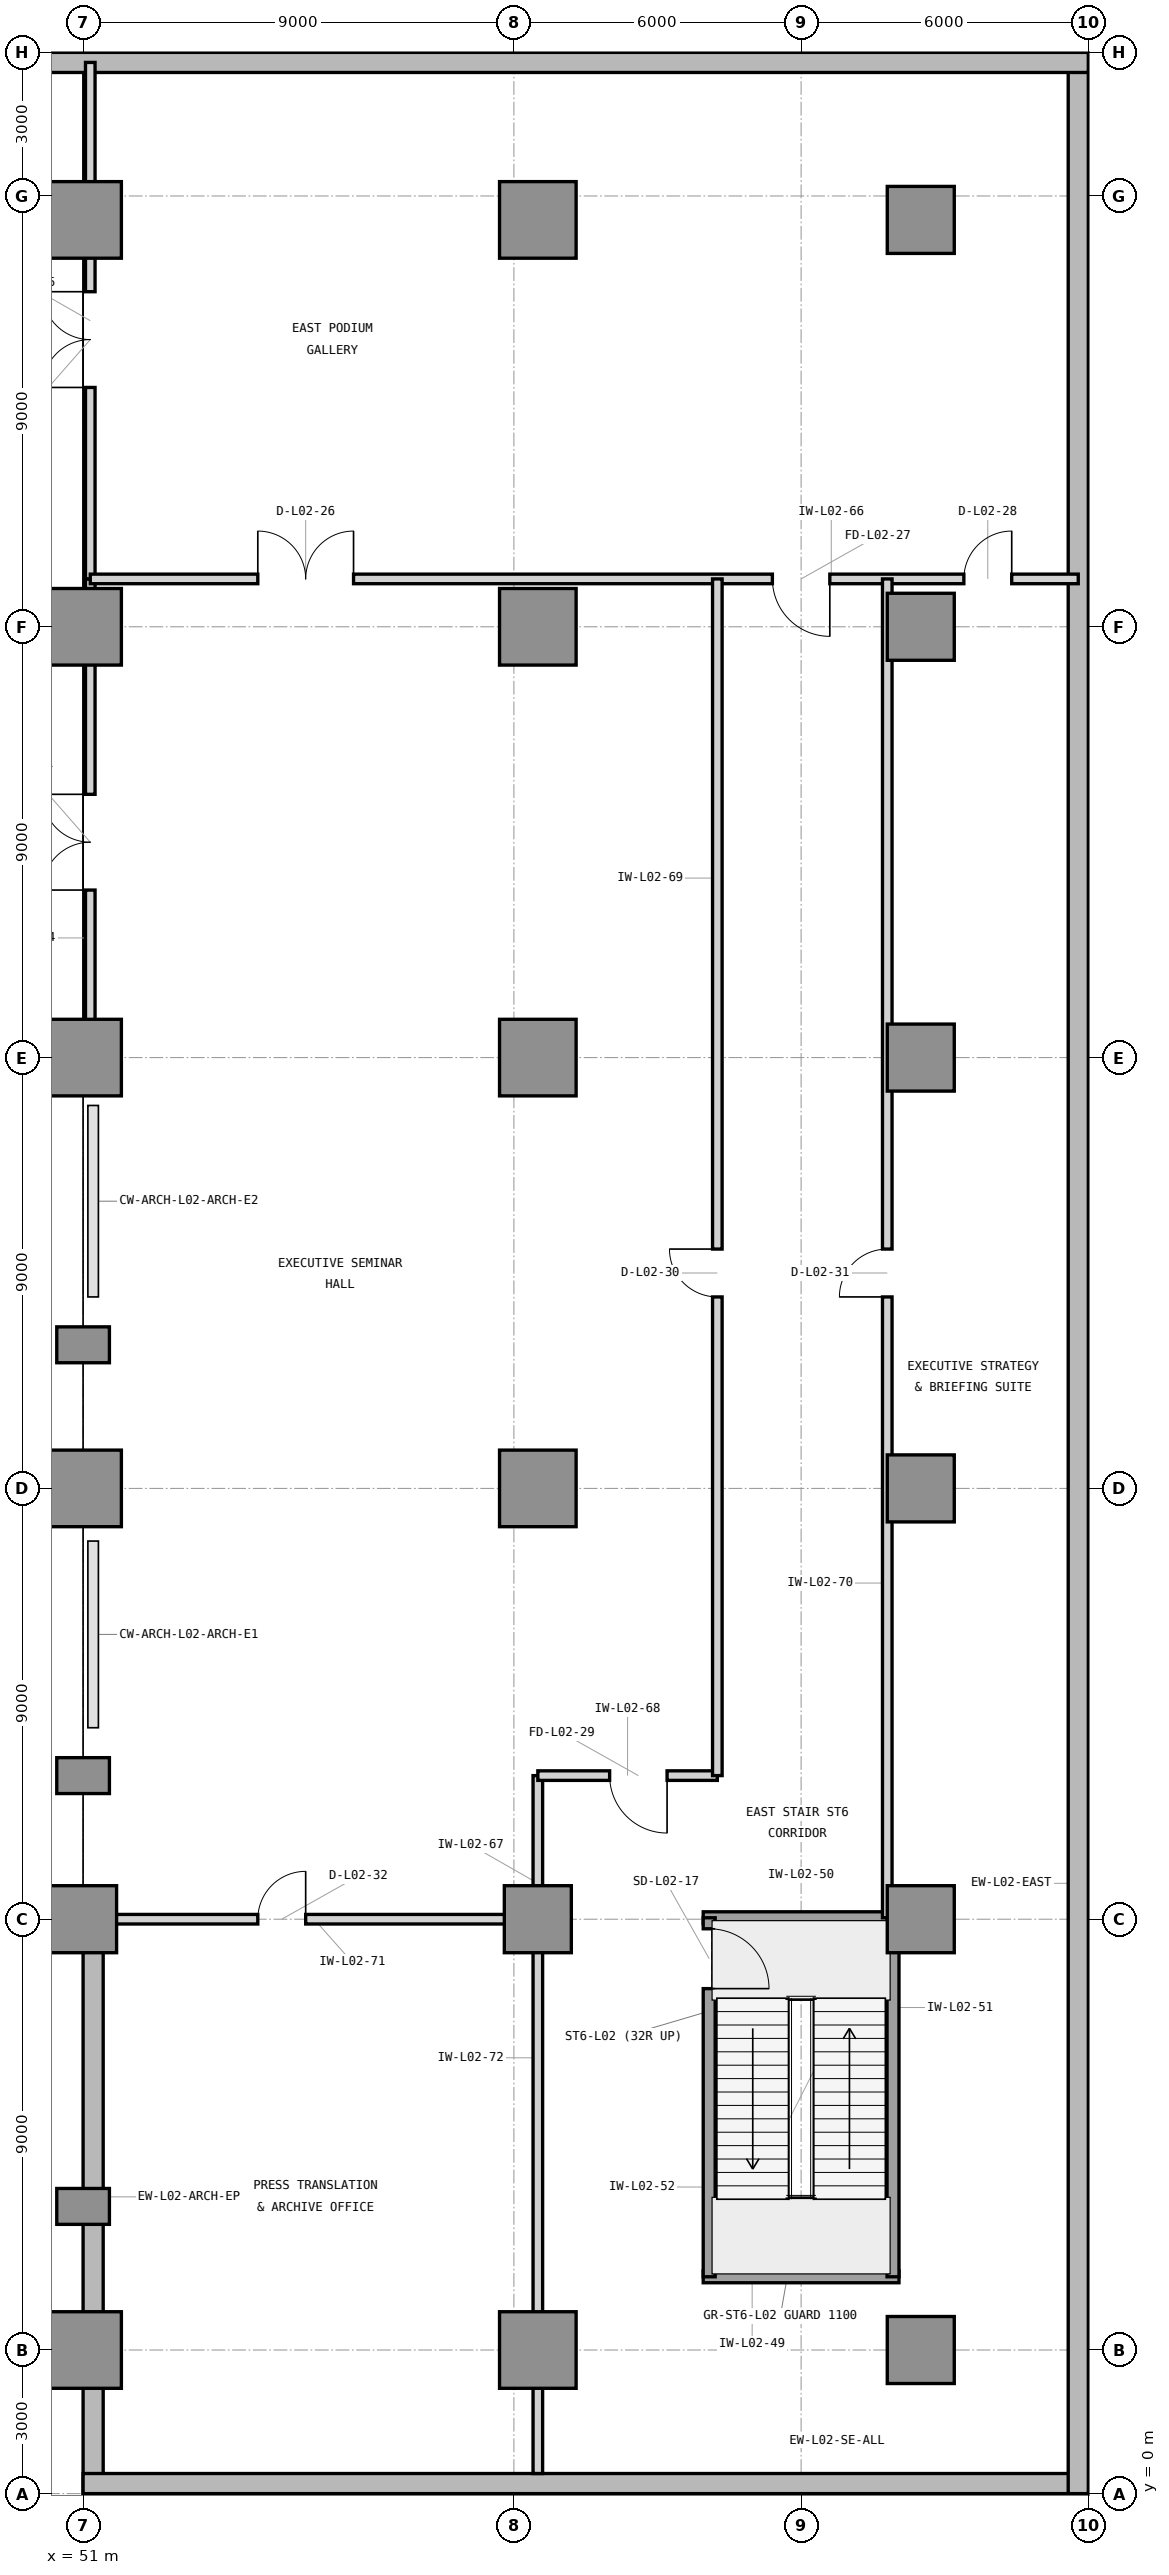
"""IFC4 building model, lengths in metres.
Left out: names, types, materials, properties, quantities, classifications, styles, units other than length and angle.
Written with IfcOpenShell. Run it as: python <this file> out.ifc"""

import sys

from ifc_helpers import new_model, si_unit, direction, frame, frame_2d, origin, origin_2d, place, context, subcontext, project, spatial, rectangle, extrude, element, fill, save


model = new_model("IFC4")
c1 = context("Model", 3, precision=1e-05, world=origin(), true_north=direction((0.0, 1.0)))
c2 = subcontext(c1, "Body", "Model", "MODEL_VIEW")
j1 = project(units=[si_unit("LENGTHUNIT", "METRE"), si_unit("PLANEANGLEUNIT", "RADIAN")], contexts=[c1])
p1 = place(None, origin())
s1 = spatial("IfcSite", under=j1, at=p1, CompositionType="ELEMENT")
p2 = place(p1, origin())
s2 = spatial("IfcBuilding", under=s1, at=p2, CompositionType="ELEMENT")
p3 = place(p2, frame((0.0, 0.0, 10.8)))
s3 = spatial("IfcBuildingStorey", under=s2, at=p3, CompositionType="ELEMENT", Elevation=10.8)
p4 = place(p3, frame((51.0, 3.0, 0.0), z_axis=(0.0, 0.0, 1.0), x_axis=(1.0, 0.0, 0.0)))
e1 = element("IfcColumn", 1, at=p4, inside=s3, PredefinedType="COLUMN", context=c2, shape_type="SweptSolid", body=[
    extrude(rectangle(XDim=1.6, YDim=1.6, at=origin_2d()), origin(), (0.0, 0.0, 1.0), 4.8),
])
p5 = place(p3, frame((51.0, 12.0, 0.0), z_axis=(0.0, 0.0, 1.0), x_axis=(1.0, 0.0, 0.0)))
e2 = element("IfcColumn", 2, at=p5, inside=s3, PredefinedType="COLUMN", context=c2, shape_type="SweptSolid", body=[
    extrude(rectangle(XDim=1.4, YDim=1.4, at=origin_2d()), origin(), (0.0, 0.0, 1.0), 4.8),
])
for number, where, z_axis, x_axis in (
    (3, (51.0, 21.0, 0.0), (0.0, 0.0, 1.0), (1.0, 0.0, 0.0)),
    (4, (51.0, 30.0, 0.0), (0.0, 0.0, 1.0), (1.0, 0.0, 0.0)),
    (5, (51.0, 39.0, 0.0), (0.0, 0.0, 1.0), (1.0, 0.0, 0.0)),
    (6, (51.0, 47.5, 0.0), (0.0, 0.0, 1.0), (1.0, 0.0, 0.0)),
    (7, (60.5, 3.0, 0.0), (0.0, 0.0, 1.0), (1.0, 0.0, 0.0)),
):
    element("IfcColumn", number, at=place(p3, frame(where, z_axis=z_axis, x_axis=x_axis)), inside=s3, PredefinedType="COLUMN", context=c2, shape_type="SweptSolid", body=[
        extrude(rectangle(XDim=1.6, YDim=1.6, at=origin_2d()), origin(), (0.0, 0.0, 1.0), 4.8),
    ])
p6 = place(p3, frame((60.5, 12.0, 0.0), z_axis=(0.0, 0.0, 1.0), x_axis=(1.0, 0.0, 0.0)))
e8 = element("IfcColumn", 8, at=p6, inside=s3, PredefinedType="COLUMN", context=c2, shape_type="SweptSolid", body=[
    extrude(rectangle(XDim=1.4, YDim=1.4, at=origin_2d()), origin(), (0.0, 0.0, 1.0), 4.8),
])
for number, where, z_axis, x_axis in (
    (9, (60.5, 21.0, 0.0), (0.0, 0.0, 1.0), (1.0, 0.0, 0.0)),
    (10, (60.5, 30.0, 0.0), (0.0, 0.0, 1.0), (1.0, 0.0, 0.0)),
    (11, (60.5, 39.0, 0.0), (0.0, 0.0, 1.0), (1.0, 0.0, 0.0)),
    (12, (60.5, 47.5, 0.0), (0.0, 0.0, 1.0), (1.0, 0.0, 0.0)),
):
    element("IfcColumn", number, at=place(p3, frame(where, z_axis=z_axis, x_axis=x_axis)), inside=s3, PredefinedType="COLUMN", context=c2, shape_type="SweptSolid", body=[
        extrude(rectangle(XDim=1.6, YDim=1.6, at=origin_2d()), origin(), (0.0, 0.0, 1.0), 4.8),
    ])
for number, where, z_axis, x_axis in (
    (13, (68.5, 3.0, 0.0), (0.0, 0.0, 1.0), (1.0, 0.0, 0.0)),
    (14, (68.5, 12.0, 0.0), (0.0, 0.0, 1.0), (1.0, 0.0, 0.0)),
    (15, (68.5, 21.0, 0.0), (0.0, 0.0, 1.0), (1.0, 0.0, 0.0)),
    (16, (68.5, 30.0, 0.0), (0.0, 0.0, 1.0), (1.0, 0.0, 0.0)),
    (17, (68.5, 39.0, 0.0), (0.0, 0.0, 1.0), (1.0, 0.0, 0.0)),
    (18, (68.5, 47.5, 0.0), (0.0, 0.0, 1.0), (1.0, 0.0, 0.0)),
):
    element("IfcColumn", number, at=place(p3, frame(where, z_axis=z_axis, x_axis=x_axis)), inside=s3, PredefinedType="COLUMN", context=c2, shape_type="SweptSolid", body=[
        extrude(rectangle(XDim=1.4, YDim=1.4, at=origin_2d()), origin(), (0.0, 0.0, 1.0), 4.8),
    ])
for number, where, z_axis, x_axis in (
    (19, (51.0, 6.0, 0.0), (0.0, 0.0, 1.0), (1.0, 0.0, 0.0)),
    (20, (51.0, 15.0, 0.0), (0.0, 0.0, 1.0), (1.0, 0.0, 0.0)),
    (21, (51.0, 24.0, 0.0), (0.0, 0.0, 1.0), (1.0, 0.0, 0.0)),
):
    element("IfcColumn", number, at=place(p3, frame(where, z_axis=z_axis, x_axis=x_axis)), inside=s3, PredefinedType="PILASTER", context=c2, shape_type="SweptSolid", body=[
        extrude(rectangle(XDim=0.75, YDim=1.1, at=origin_2d()), origin(), (0.0, 0.0, 1.0), 4.8),
    ])
p7 = place(p3, frame((33.0, 30.21, 0.0), z_axis=(0.0, 0.0, 1.0), x_axis=(1.0, 0.0, 0.0)))
e22 = element("IfcWall", 22, at=p7, inside=s3, PredefinedType="STANDARD", context=c2, shape_type="SweptSolid", body=[
    extrude(rectangle(XDim=18.0, YDim=0.42, at=frame_2d((9.0, 0.0))), origin(), (0.0, 0.0, 1.0), 3.85),
])
p8 = place(p3, frame((51.21, 0.0, 0.0), z_axis=(0.0, 0.0, 1.0), x_axis=(0.0, 1.0, 0.0)))
e23 = element("IfcWall", 23, at=p8, inside=s3, PredefinedType="STANDARD", context=c2, shape_type="SweptSolid", body=[
    extrude(rectangle(XDim=12.4, YDim=0.42, at=frame_2d((6.2, 0.0))), origin(), (0.0, 0.0, 1.0), 3.85),
])
p9 = place(p3, frame((51.0, 0.21, 0.0), z_axis=(0.0, 0.0, 1.0), x_axis=(1.0, 0.0, 0.0)))
e24 = element("IfcWall", 24, at=p9, inside=s3, PredefinedType="STANDARD", context=c2, shape_type="SweptSolid", body=[
    extrude(rectangle(XDim=21.0, YDim=0.42, at=frame_2d((10.5, 0.0))), origin(), (0.0, 0.0, 1.0), 4.8),
])
p10 = place(p3, frame((71.79, 0.0, 0.0), z_axis=(0.0, 0.0, 1.0), x_axis=(0.0, 1.0, 0.0)))
e25 = element("IfcWall", 25, at=p10, inside=s3, PredefinedType="STANDARD", context=c2, shape_type="SweptSolid", body=[
    extrude(rectangle(XDim=51.0, YDim=0.42, at=frame_2d((25.5, 0.0))), origin(), (0.0, 0.0, 1.0), 4.8),
])
p11 = place(p3, frame((72.0, 50.79, 0.0), z_axis=(0.0, 0.0, 1.0), x_axis=(-1.0, 0.0, 0.0)))
e26 = element("IfcWall", 26, at=p11, inside=s3, PredefinedType="STANDARD", context=c2, shape_type="SweptSolid", body=[
    extrude(rectangle(XDim=72.0, YDim=0.42, at=frame_2d((36.0, 0.0))), origin(), (0.0, 0.0, 1.0), 4.8),
])
for number, where, z_axis, x_axis in (
    (27, (63.955, 4.53, 0.0), (0.0, 0.0, 1.0), (1.0, 0.0, 0.0)),
    (28, (63.955, 12.03, 0.0), (0.0, 0.0, 1.0), (1.0, 0.0, 0.0)),
):
    element("IfcWall", number, at=place(p3, frame(where, z_axis=z_axis, x_axis=x_axis)), inside=s3, PredefinedType="SHEAR", context=c2, shape_type="SweptSolid", body=[
        extrude(rectangle(XDim=4.09, YDim=0.25, at=frame_2d((2.045, 0.0))), origin(), (0.0, 0.0, 1.0), 5.4),
    ])
p12 = place(p3, frame((67.92, 4.53, 0.0), z_axis=(0.0, 0.0, 1.0), x_axis=(0.0, 1.0, 0.0)))
e29 = element("IfcWall", 29, at=p12, inside=s3, PredefinedType="SHEAR", context=c2, shape_type="SweptSolid", body=[
    extrude(rectangle(XDim=7.5, YDim=0.25, at=frame_2d((3.75, 0.0))), origin(), (0.0, 0.0, 1.0), 5.4),
])
p13 = place(p3, frame((64.08, 4.53, 0.0), z_axis=(0.0, 0.0, 1.0), x_axis=(0.0, 1.0, 0.0)))
e30 = element("IfcWall", 30, at=p13, inside=s3, PredefinedType="SHEAR", context=c2, shape_type="SweptSolid", body=[
    extrude(rectangle(XDim=7.5, YDim=0.25, at=frame_2d((3.75, 0.0))), origin(), (0.0, 0.0, 1.0), 5.4),
])
p14 = place(p13, frame((6.02, 0.0, 0.0)))
e31 = element("IfcOpeningElement", 31, at=p14, cuts=e30, PredefinedType="OPENING", context=c2, shape_type="SweptSolid", body=[
    extrude(rectangle(XDim=1.25, YDim=2.2, at=frame_2d((0.625, 1.1))), frame((0.0, 0.135, 0.0), z_axis=(0.0, -1.0, 0.0), x_axis=(1.0, 0.0, 0.0)), (0.0, 0.0, 1.0), 0.27),
])
p15 = place(p3, frame((51.15, 30.0, 0.0), z_axis=(0.0, 0.0, 1.0), x_axis=(0.0, 1.0, 0.0)))
e32 = element("IfcWall", 32, at=p15, inside=s3, PredefinedType="PARTITIONING", context=c2, shape_type="SweptSolid", body=[
    extrude(rectangle(XDim=10.0, YDim=0.2, at=frame_2d((5.0, 0.0))), origin(), (0.0, 0.0, 1.0), 3.85),
])
p16 = place(p15, frame((3.5, 0.0, 0.0)))
e33 = element("IfcOpeningElement", 33, at=p16, cuts=e32, PredefinedType="OPENING", context=c2, shape_type="SweptSolid", body=[
    extrude(rectangle(XDim=2.0, YDim=2.5, at=frame_2d((1.0, 1.25))), frame((0.0, 0.11, 0.0), z_axis=(0.0, -1.0, 0.0), x_axis=(1.0, 0.0, 0.0)), (0.0, 0.0, 1.0), 0.22),
])
p17 = place(p3, frame((51.15, 40.0, 0.0), z_axis=(0.0, 0.0, 1.0), x_axis=(0.0, 1.0, 0.0)))
e34 = element("IfcWall", 34, at=p17, inside=s3, PredefinedType="PARTITIONING", context=c2, shape_type="SweptSolid", body=[
    extrude(rectangle(XDim=10.79, YDim=0.2, at=frame_2d((5.395, 0.0))), origin(), (0.0, 0.0, 1.0), 3.85),
])
p18 = place(p17, frame((4.0, 0.0, 0.0)))
e35 = element("IfcOpeningElement", 35, at=p18, cuts=e34, PredefinedType="OPENING", context=c2, shape_type="SweptSolid", body=[
    extrude(rectangle(XDim=2.0, YDim=2.5, at=frame_2d((1.0, 1.25))), frame((0.0, 0.11, 0.0), z_axis=(0.0, -1.0, 0.0), x_axis=(1.0, 0.0, 0.0)), (0.0, 0.0, 1.0), 0.22),
])
p19 = place(p3, frame((51.15, 40.0, 0.0), z_axis=(0.0, 0.0, 1.0), x_axis=(1.0, 0.0, 0.0)))
e36 = element("IfcWall", 36, at=p19, inside=s3, PredefinedType="PARTITIONING", context=c2, shape_type="SweptSolid", body=[
    extrude(rectangle(XDim=20.64, YDim=0.2, at=frame_2d((10.32, 0.0))), origin(), (0.0, 0.0, 1.0), 4.79),
])
p20 = place(p19, frame((3.5, 0.0, 0.0)))
e37 = element("IfcOpeningElement", 37, at=p20, cuts=e36, PredefinedType="OPENING", context=c2, shape_type="SweptSolid", body=[
    extrude(rectangle(XDim=2.0, YDim=2.5, at=frame_2d((1.0, 1.25))), frame((0.0, 0.11, 0.0), z_axis=(0.0, -1.0, 0.0), x_axis=(1.0, 0.0, 0.0)), (0.0, 0.0, 1.0), 0.22),
])
p21 = place(p19, frame((14.25, 0.0, 0.0)))
e38 = element("IfcOpeningElement", 38, at=p21, cuts=e36, PredefinedType="OPENING", context=c2, shape_type="SweptSolid", body=[
    extrude(rectangle(XDim=1.2, YDim=2.2, at=frame_2d((0.6, 1.1))), frame((0.0, 0.11, 0.0), z_axis=(0.0, -1.0, 0.0), x_axis=(1.0, 0.0, 0.0)), (0.0, 0.0, 1.0), 0.22),
])
p22 = place(p19, frame((18.25, 0.0, 0.0)))
e39 = element("IfcOpeningElement", 39, at=p22, cuts=e36, PredefinedType="OPENING", context=c2, shape_type="SweptSolid", body=[
    extrude(rectangle(XDim=1.0, YDim=2.15, at=frame_2d((0.5, 1.075))), frame((0.0, 0.11, 0.0), z_axis=(0.0, -1.0, 0.0), x_axis=(1.0, 0.0, 0.0)), (0.0, 0.0, 1.0), 0.22),
])
p23 = place(p3, frame((60.5, 12.0, 0.0), z_axis=(0.0, 0.0, 1.0), x_axis=(0.0, 1.0, 0.0)))
e40 = element("IfcWall", 40, at=p23, inside=s3, PredefinedType="PARTITIONING", context=c2, shape_type="SweptSolid", body=[
    extrude(rectangle(XDim=3.0, YDim=0.2, at=frame_2d((1.5, 0.0))), origin(), (0.0, 0.0, 1.0), 3.85),
])
p24 = place(p3, frame((60.5, 15.0, 0.0), z_axis=(0.0, 0.0, 1.0), x_axis=(1.0, 0.0, 0.0)))
e41 = element("IfcWall", 41, at=p24, inside=s3, PredefinedType="PARTITIONING", context=c2, shape_type="SweptSolid", body=[
    extrude(rectangle(XDim=3.75, YDim=0.2, at=frame_2d((1.875, 0.0))), origin(), (0.0, 0.0, 1.0), 4.173),
])
p25 = place(p24, frame((1.5, 0.0, 0.0)))
e42 = element("IfcOpeningElement", 42, at=p25, cuts=e41, PredefinedType="OPENING", context=c2, shape_type="SweptSolid", body=[
    extrude(rectangle(XDim=1.2, YDim=2.2, at=frame_2d((0.6, 1.1))), frame((0.0, 0.11, 0.0), z_axis=(0.0, -1.0, 0.0), x_axis=(1.0, 0.0, 0.0)), (0.0, 0.0, 1.0), 0.22),
])
p26 = place(p3, frame((64.25, 15.0, 0.0), z_axis=(0.0, 0.0, 1.0), x_axis=(0.0, 1.0, 0.0)))
e43 = element("IfcWall", 43, at=p26, inside=s3, PredefinedType="PARTITIONING", context=c2, shape_type="SweptSolid", body=[
    extrude(rectangle(XDim=25.0, YDim=0.2, at=frame_2d((12.5, 0.0))), origin(), (0.0, 0.0, 1.0), 4.79),
])
p27 = place(p26, frame((10.0, 0.0, 0.0)))
e44 = element("IfcOpeningElement", 44, at=p27, cuts=e43, PredefinedType="OPENING", context=c2, shape_type="SweptSolid", body=[
    extrude(rectangle(XDim=1.0, YDim=2.15, at=frame_2d((0.5, 1.075))), frame((0.0, 0.11, 0.0), z_axis=(0.0, -1.0, 0.0), x_axis=(1.0, 0.0, 0.0)), (0.0, 0.0, 1.0), 0.22),
])
p28 = place(p3, frame((67.8, 12.03, 0.0), z_axis=(0.0, 0.0, 1.0), x_axis=(0.0, 1.0, 0.0)))
e45 = element("IfcWall", 45, at=p28, inside=s3, PredefinedType="PARTITIONING", context=c2, shape_type="SweptSolid", body=[
    extrude(rectangle(XDim=27.97, YDim=0.2, at=frame_2d((13.985, 0.0))), origin(), (0.0, 0.0, 1.0), 4.79),
])
p29 = place(p28, frame((12.97, 0.0, 0.0)))
e46 = element("IfcOpeningElement", 46, at=p29, cuts=e45, PredefinedType="OPENING", context=c2, shape_type="SweptSolid", body=[
    extrude(rectangle(XDim=1.0, YDim=2.15, at=frame_2d((0.5, 1.075))), frame((0.0, 0.11, 0.0), z_axis=(0.0, -1.0, 0.0), x_axis=(1.0, 0.0, 0.0)), (0.0, 0.0, 1.0), 0.22),
])
p30 = place(p3, frame((51.15, 12.0, 0.0), z_axis=(0.0, 0.0, 1.0), x_axis=(1.0, 0.0, 0.0)))
e47 = element("IfcWall", 47, at=p30, inside=s3, PredefinedType="PARTITIONING", context=c2, shape_type="SweptSolid", body=[
    extrude(rectangle(XDim=9.35, YDim=0.2, at=frame_2d((4.675, 0.0))), origin(), (0.0, 0.0, 1.0), 3.85),
])
p31 = place(p30, frame((3.5, 0.0, 0.0)))
e48 = element("IfcOpeningElement", 48, at=p31, cuts=e47, PredefinedType="OPENING", context=c2, shape_type="SweptSolid", body=[
    extrude(rectangle(XDim=1.0, YDim=2.15, at=frame_2d((0.5, 1.075))), frame((0.0, 0.11, 0.0), z_axis=(0.0, -1.0, 0.0), x_axis=(1.0, 0.0, 0.0)), (0.0, 0.0, 1.0), 0.22),
])
p32 = place(p3, frame((60.5, 0.42, 0.0), z_axis=(0.0, 0.0, 1.0), x_axis=(0.0, 1.0, 0.0)))
e49 = element("IfcWall", 49, at=p32, inside=s3, PredefinedType="PARTITIONING", context=c2, shape_type="SweptSolid", body=[
    extrude(rectangle(XDim=11.58, YDim=0.2, at=frame_2d((5.79, 0.0))), origin(), (0.0, 0.0, 1.0), 3.85),
])
p33 = place(p14, frame((1.25, 0.0, 0.0), z_axis=(0.0, 0.0, 1.0), x_axis=(-1.0, 0.0, 0.0)))
e50 = element("IfcDoor", 50, at=p33, inside=s3, OperationType="SINGLE_SWING_RIGHT", PredefinedType="DOOR", context=c2, shape_type="SweptSolid", body=[
    extrude(rectangle(XDim=1.25, YDim=2.2, at=frame_2d((0.625, 1.1))), frame((0.0, 0.025, 0.0), z_axis=(0.0, -1.0, 0.0), x_axis=(1.0, 0.0, 0.0)), (0.0, 0.0, 1.0), 0.05),
])
fill(e31, e50)
p34 = place(p16, origin())
e51 = element("IfcDoor", 51, at=p34, inside=s3, OperationType="DOUBLE_DOOR_SINGLE_SWING", PredefinedType="DOOR", context=c2, shape_type="SweptSolid", body=[
    extrude(rectangle(XDim=2.0, YDim=2.5, at=frame_2d((1.0, 1.25))), frame((0.0, 0.025, 0.0), z_axis=(0.0, -1.0, 0.0), x_axis=(1.0, 0.0, 0.0)), (0.0, 0.0, 1.0), 0.05),
])
fill(e33, e51)
p35 = place(p18, origin())
e52 = element("IfcDoor", 52, at=p35, inside=s3, OperationType="DOUBLE_DOOR_SINGLE_SWING", PredefinedType="DOOR", context=c2, shape_type="SweptSolid", body=[
    extrude(rectangle(XDim=2.0, YDim=2.5, at=frame_2d((1.0, 1.25))), frame((0.0, 0.025, 0.0), z_axis=(0.0, -1.0, 0.0), x_axis=(1.0, 0.0, 0.0)), (0.0, 0.0, 1.0), 0.05),
])
fill(e35, e52)
p36 = place(p20, origin())
e53 = element("IfcDoor", 53, at=p36, inside=s3, OperationType="DOUBLE_DOOR_SINGLE_SWING", PredefinedType="DOOR", context=c2, shape_type="SweptSolid", body=[
    extrude(rectangle(XDim=2.0, YDim=2.5, at=frame_2d((1.0, 1.25))), frame((0.0, 0.025, 0.0), z_axis=(0.0, -1.0, 0.0), x_axis=(1.0, 0.0, 0.0)), (0.0, 0.0, 1.0), 0.05),
])
fill(e37, e53)
p37 = place(p21, frame((1.2, 0.0, 0.0), z_axis=(0.0, 0.0, 1.0), x_axis=(-1.0, 0.0, 0.0)))
e54 = element("IfcDoor", 54, at=p37, inside=s3, OperationType="SINGLE_SWING_LEFT", PredefinedType="DOOR", context=c2, shape_type="SweptSolid", body=[
    extrude(rectangle(XDim=1.2, YDim=2.2, at=frame_2d((0.6, 1.1))), frame((0.0, 0.025, 0.0), z_axis=(0.0, -1.0, 0.0), x_axis=(1.0, 0.0, 0.0)), (0.0, 0.0, 1.0), 0.05),
])
fill(e38, e54)
p38 = place(p22, origin())
e55 = element("IfcDoor", 55, at=p38, inside=s3, OperationType="SINGLE_SWING_RIGHT", PredefinedType="DOOR", context=c2, shape_type="SweptSolid", body=[
    extrude(rectangle(XDim=1.0, YDim=2.15, at=frame_2d((0.5, 1.075))), frame((0.0, 0.025, 0.0), z_axis=(0.0, -1.0, 0.0), x_axis=(1.0, 0.0, 0.0)), (0.0, 0.0, 1.0), 0.05),
])
fill(e39, e55)
p39 = place(p25, frame((1.2, 0.0, 0.0), z_axis=(0.0, 0.0, 1.0), x_axis=(-1.0, 0.0, 0.0)))
e56 = element("IfcDoor", 56, at=p39, inside=s3, OperationType="SINGLE_SWING_LEFT", PredefinedType="DOOR", context=c2, shape_type="SweptSolid", body=[
    extrude(rectangle(XDim=1.2, YDim=2.2, at=frame_2d((0.6, 1.1))), frame((0.0, 0.025, 0.0), z_axis=(0.0, -1.0, 0.0), x_axis=(1.0, 0.0, 0.0)), (0.0, 0.0, 1.0), 0.05),
])
fill(e42, e56)
p40 = place(p27, origin())
e57 = element("IfcDoor", 57, at=p40, inside=s3, OperationType="SINGLE_SWING_RIGHT", PredefinedType="DOOR", context=c2, shape_type="SweptSolid", body=[
    extrude(rectangle(XDim=1.0, YDim=2.15, at=frame_2d((0.5, 1.075))), frame((0.0, 0.025, 0.0), z_axis=(0.0, -1.0, 0.0), x_axis=(1.0, 0.0, 0.0)), (0.0, 0.0, 1.0), 0.05),
])
fill(e44, e57)
p41 = place(p29, origin())
e58 = element("IfcDoor", 58, at=p41, inside=s3, OperationType="SINGLE_SWING_LEFT", PredefinedType="DOOR", context=c2, shape_type="SweptSolid", body=[
    extrude(rectangle(XDim=1.0, YDim=2.15, at=frame_2d((0.5, 1.075))), frame((0.0, 0.025, 0.0), z_axis=(0.0, -1.0, 0.0), x_axis=(1.0, 0.0, 0.0)), (0.0, 0.0, 1.0), 0.05),
])
fill(e46, e58)
p42 = place(p31, origin())
e59 = element("IfcDoor", 59, at=p42, inside=s3, OperationType="SINGLE_SWING_RIGHT", PredefinedType="DOOR", context=c2, shape_type="SweptSolid", body=[
    extrude(rectangle(XDim=1.0, YDim=2.15, at=frame_2d((0.5, 1.075))), frame((0.0, 0.025, 0.0), z_axis=(0.0, -1.0, 0.0), x_axis=(1.0, 0.0, 0.0)), (0.0, 0.0, 1.0), 0.05),
])
fill(e48, e59)
save(model, sys.argv[1])
